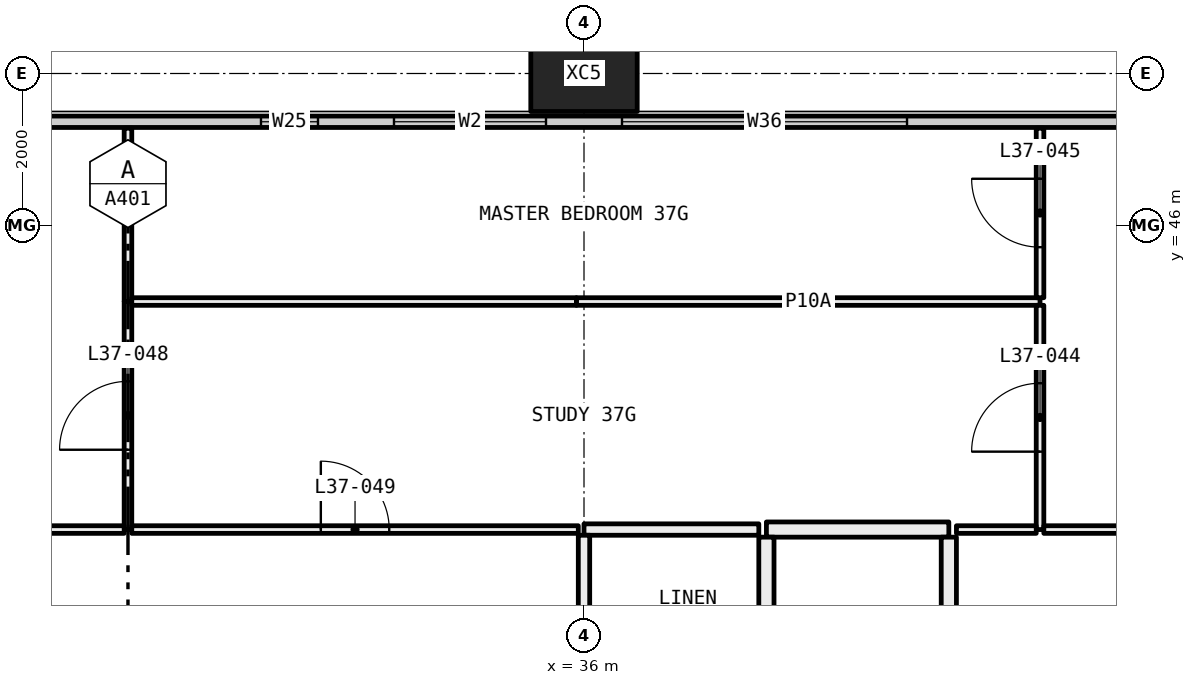
"""IFC4 building model, lengths in metres.
Left out: names, types, materials, properties, quantities, classifications, styles, units other than length and angle.
Written with IfcOpenShell. Run it as: python <this file> out.ifc"""

import sys

from ifc_helpers import new_model, si_unit, direction, frame, frame_2d, origin, origin_2d, place, context, subcontext, project, spatial, rectangle, hollow_rectangle, extrude, element, fill, save


model = new_model("IFC4")
c1 = context("Model", 3, precision=1e-05, world=origin(), true_north=direction((0.0, 1.0)))
c2 = subcontext(c1, "Body", "Model", "MODEL_VIEW")
j1 = project(units=[si_unit("LENGTHUNIT", "METRE"), si_unit("PLANEANGLEUNIT", "RADIAN")], contexts=[c1])
p1 = place(None, origin())
s1 = spatial("IfcSite", under=j1, at=p1, CompositionType="ELEMENT")
p2 = place(p1, origin())
s2 = spatial("IfcBuilding", under=s1, at=p2, CompositionType="ELEMENT")
p3 = place(p2, frame((0.0, 0.0, 141.45)))
s3 = spatial("IfcBuildingStorey", under=s2, at=p3, CompositionType="ELEMENT", Elevation=141.45)
p4 = place(p3, frame((36.0, 48.0, -0.4), z_axis=(0.0, 0.0, 1.0), x_axis=(1.0, 0.0, 0.0)))
e1 = element("IfcColumn", 1, at=p4, inside=s3, PredefinedType="COLUMN", context=c2, shape_type="SweptSolid", body=[
    extrude(hollow_rectangle(XDim=1.4, YDim=1.0, WallThickness=0.055, at=origin_2d()), origin(), (0.0, 0.0, 1.0), 3.45),
])
p5 = place(p3, frame((6.56, 47.365, 0.0), z_axis=(0.0, 0.0, 1.0), x_axis=(1.0, 0.0, 0.0)))
e2 = element("IfcWall", 2, at=p5, inside=s3, PredefinedType="ELEMENTEDWALL", context=c2, shape_type="SweptSolid", body=[
    extrude(rectangle(XDim=58.88, YDim=0.15, at=frame_2d((29.44, 0.0))), origin(), (0.0, 0.0, 1.0), 3.05),
])
p6 = place(p5, frame((0.44, 0.0, 0.45)))
e3 = element("IfcOpeningElement", 3, at=p6, cuts=e2, PredefinedType="OPENING", context=c2, shape_type="SweptSolid", body=[
    extrude(rectangle(XDim=4.5, YDim=2.55, at=frame_2d((2.25, 1.275))), frame((0.0, 0.085, 0.0), z_axis=(0.0, -1.0, 0.0), x_axis=(1.0, 0.0, 0.0)), (0.0, 0.0, 1.0), 0.17),
])
p7 = place(p5, frame((5.94, 0.0, 0.45)))
e4 = element("IfcOpeningElement", 4, at=p7, cuts=e2, PredefinedType="OPENING", context=c2, shape_type="SweptSolid", body=[
    extrude(rectangle(XDim=3.75, YDim=2.55, at=frame_2d((1.875, 1.275))), frame((0.0, 0.085, 0.0), z_axis=(0.0, -1.0, 0.0), x_axis=(1.0, 0.0, 0.0)), (0.0, 0.0, 1.0), 0.17),
])
p8 = place(p5, frame((13.19, 0.0, 0.45)))
e5 = element("IfcOpeningElement", 5, at=p8, cuts=e2, PredefinedType="OPENING", context=c2, shape_type="SweptSolid", body=[
    extrude(rectangle(XDim=3.75, YDim=2.55, at=frame_2d((1.875, 1.275))), frame((0.0, 0.085, 0.0), z_axis=(0.0, -1.0, 0.0), x_axis=(1.0, 0.0, 0.0)), (0.0, 0.0, 1.0), 0.17),
])
p9 = place(p5, frame((17.94, 0.0, 0.45)))
e6 = element("IfcOpeningElement", 6, at=p9, cuts=e2, PredefinedType="OPENING", context=c2, shape_type="SweptSolid", body=[
    extrude(rectangle(XDim=3.75, YDim=2.55, at=frame_2d((1.875, 1.275))), frame((0.0, 0.085, 0.0), z_axis=(0.0, -1.0, 0.0), x_axis=(1.0, 0.0, 0.0)), (0.0, 0.0, 1.0), 0.17),
])
p10 = place(p5, frame((25.19, 0.0, 0.45)))
e7 = element("IfcOpeningElement", 7, at=p10, cuts=e2, PredefinedType="OPENING", context=c2, shape_type="SweptSolid", body=[
    extrude(rectangle(XDim=0.75, YDim=2.55, at=frame_2d((0.375, 1.275))), frame((0.0, 0.085, 0.0), z_axis=(0.0, -1.0, 0.0), x_axis=(1.0, 0.0, 0.0)), (0.0, 0.0, 1.0), 0.17),
])
p11 = place(p5, frame((26.94, 0.0, 0.45)))
e8 = element("IfcOpeningElement", 8, at=p11, cuts=e2, PredefinedType="OPENING", context=c2, shape_type="SweptSolid", body=[
    extrude(rectangle(XDim=2.0, YDim=2.55, at=frame_2d((1.0, 1.275))), frame((0.0, 0.085, 0.0), z_axis=(0.0, -1.0, 0.0), x_axis=(1.0, 0.0, 0.0)), (0.0, 0.0, 1.0), 0.17),
])
p12 = place(p5, frame((29.94, 0.0, 0.45)))
e9 = element("IfcOpeningElement", 9, at=p12, cuts=e2, PredefinedType="OPENING", context=c2, shape_type="SweptSolid", body=[
    extrude(rectangle(XDim=3.75, YDim=2.55, at=frame_2d((1.875, 1.275))), frame((0.0, 0.085, 0.0), z_axis=(0.0, -1.0, 0.0), x_axis=(1.0, 0.0, 0.0)), (0.0, 0.0, 1.0), 0.17),
])
p13 = place(p5, frame((37.19, 0.0, 0.45)))
e10 = element("IfcOpeningElement", 10, at=p13, cuts=e2, PredefinedType="OPENING", context=c2, shape_type="SweptSolid", body=[
    extrude(rectangle(XDim=3.75, YDim=2.55, at=frame_2d((1.875, 1.275))), frame((0.0, 0.085, 0.0), z_axis=(0.0, -1.0, 0.0), x_axis=(1.0, 0.0, 0.0)), (0.0, 0.0, 1.0), 0.17),
])
p14 = place(p5, frame((41.94, 0.0, 0.45)))
e11 = element("IfcOpeningElement", 11, at=p14, cuts=e2, PredefinedType="OPENING", context=c2, shape_type="SweptSolid", body=[
    extrude(rectangle(XDim=3.75, YDim=2.55, at=frame_2d((1.875, 1.275))), frame((0.0, 0.085, 0.0), z_axis=(0.0, -1.0, 0.0), x_axis=(1.0, 0.0, 0.0)), (0.0, 0.0, 1.0), 0.17),
])
p15 = place(p5, frame((49.19, 0.0, 0.45)))
e12 = element("IfcOpeningElement", 12, at=p15, cuts=e2, PredefinedType="OPENING", context=c2, shape_type="SweptSolid", body=[
    extrude(rectangle(XDim=0.75, YDim=2.55, at=frame_2d((0.375, 1.275))), frame((0.0, 0.085, 0.0), z_axis=(0.0, -1.0, 0.0), x_axis=(1.0, 0.0, 0.0)), (0.0, 0.0, 1.0), 0.17),
])
p16 = place(p5, frame((50.94, 0.0, 0.45)))
e13 = element("IfcOpeningElement", 13, at=p16, cuts=e2, PredefinedType="OPENING", context=c2, shape_type="SweptSolid", body=[
    extrude(rectangle(XDim=2.0, YDim=2.55, at=frame_2d((1.0, 1.275))), frame((0.0, 0.085, 0.0), z_axis=(0.0, -1.0, 0.0), x_axis=(1.0, 0.0, 0.0)), (0.0, 0.0, 1.0), 0.17),
])
p17 = place(p5, frame((53.94, 0.0, 0.45)))
e14 = element("IfcOpeningElement", 14, at=p17, cuts=e2, PredefinedType="OPENING", context=c2, shape_type="SweptSolid", body=[
    extrude(rectangle(XDim=4.5, YDim=2.55, at=frame_2d((2.25, 1.275))), frame((0.0, 0.085, 0.0), z_axis=(0.0, -1.0, 0.0), x_axis=(1.0, 0.0, 0.0)), (0.0, 0.0, 1.0), 0.17),
])
p18 = place(p3, frame((30.0, 42.0, 0.0), z_axis=(0.0, 0.0, 1.0), x_axis=(0.0, 1.0, 0.0)))
e15 = element("IfcWall", 15, at=p18, inside=s3, PredefinedType="PARTITIONING", context=c2, shape_type="SweptSolid", body=[
    extrude(rectangle(XDim=3.0, YDim=0.1, at=frame_2d((1.5, 0.0))), origin(), (0.0, 0.0, 1.0), 3.05),
])
p19 = place(p18, frame((1.05, 0.0, 0.0)))
e16 = element("IfcOpeningElement", 16, at=p19, cuts=e15, PredefinedType="OPENING", context=c2, shape_type="SweptSolid", body=[
    extrude(rectangle(XDim=0.9, YDim=2.1, at=frame_2d((0.45, 1.05))), frame((0.0, 0.06, 0.0), z_axis=(0.0, -1.0, 0.0), x_axis=(1.0, 0.0, 0.0)), (0.0, 0.0, 1.0), 0.12),
])
p20 = place(p3, frame((30.0, 45.0, 0.0), z_axis=(0.0, 0.0, 1.0), x_axis=(0.0, 1.0, 0.0)))
e17 = element("IfcWall", 17, at=p20, inside=s3, PredefinedType="PARTITIONING", context=c2, shape_type="SweptSolid", body=[
    extrude(rectangle(XDim=2.28, YDim=0.1, at=frame_2d((1.14, 0.0))), origin(), (0.0, 0.0, 1.0), 3.05),
])
p21 = place(p3, frame((26.0, 42.0, 0.0), z_axis=(0.0, 0.0, 1.0), x_axis=(1.0, 0.0, 0.0)))
e18 = element("IfcWall", 18, at=p21, inside=s3, PredefinedType="PARTITIONING", context=c2, shape_type="SweptSolid", body=[
    extrude(rectangle(XDim=3.95, YDim=0.1, at=frame_2d((1.975, 0.0))), origin(), (0.0, 0.0, 1.0), 3.05),
])
p22 = place(p3, frame((42.0, 45.0, 0.0), z_axis=(0.0, 0.0, 1.0), x_axis=(-1.0, 0.0, 0.0)))
e19 = element("IfcWall", 19, at=p22, inside=s3, PredefinedType="PARTITIONING", context=c2, shape_type="SweptSolid", body=[
    extrude(rectangle(XDim=6.1, YDim=0.1, at=frame_2d((3.05, 0.0))), origin(), (0.0, 0.0, 1.0), 2.45),
])
p23 = place(p3, frame((35.9, 45.0, 0.0), z_axis=(0.0, 0.0, 1.0), x_axis=(-1.0, 0.0, 0.0)))
e20 = element("IfcWall", 20, at=p23, inside=s3, PredefinedType="PARTITIONING", context=c2, shape_type="SweptSolid", body=[
    extrude(rectangle(XDim=5.85, YDim=0.1, at=frame_2d((2.925, 0.0))), origin(), (0.0, 0.0, 1.0), 3.05),
])
p24 = place(p3, frame((42.0, 42.0, 0.0), z_axis=(0.0, 0.0, 1.0), x_axis=(0.0, 1.0, 0.0)))
e21 = element("IfcWall", 21, at=p24, inside=s3, PredefinedType="PARTITIONING", context=c2, shape_type="SweptSolid", body=[
    extrude(rectangle(XDim=2.95, YDim=0.1, at=frame_2d((1.475, 0.0))), origin(), (0.0, 0.0, 1.0), 3.05),
])
p25 = place(p24, frame((1.025, 0.0, 0.0)))
e22 = element("IfcOpeningElement", 22, at=p25, cuts=e21, PredefinedType="OPENING", context=c2, shape_type="SweptSolid", body=[
    extrude(rectangle(XDim=0.9, YDim=2.1, at=frame_2d((0.45, 1.05))), frame((0.0, 0.06, 0.0), z_axis=(0.0, -1.0, 0.0), x_axis=(1.0, 0.0, 0.0)), (0.0, 0.0, 1.0), 0.12),
])
p26 = place(p3, frame((30.05, 42.0, 0.0), z_axis=(0.0, 0.0, 1.0), x_axis=(1.0, 0.0, 0.0)))
e23 = element("IfcWall", 23, at=p26, inside=s3, PredefinedType="PARTITIONING", context=c2, shape_type="SweptSolid", body=[
    extrude(rectangle(XDim=5.875, YDim=0.1, at=frame_2d((2.938, 0.0))), origin(), (0.0, 0.0, 1.0), 2.45),
])
p27 = place(p26, frame((2.488, 0.0, 0.0)))
e24 = element("IfcOpeningElement", 24, at=p27, cuts=e23, PredefinedType="OPENING", context=c2, shape_type="SweptSolid", body=[
    extrude(rectangle(XDim=0.9, YDim=2.1, at=frame_2d((0.45, 1.05))), frame((0.0, 0.06, 0.0), z_axis=(0.0, -1.0, 0.0), x_axis=(1.0, 0.0, 0.0)), (0.0, 0.0, 1.0), 0.12),
])
p28 = place(p3, frame((36.0, 42.0, 0.0), z_axis=(0.0, 0.0, 1.0), x_axis=(1.0, 0.0, 0.0)))
e25 = element("IfcWall", 25, at=p28, inside=s3, PredefinedType="PARTITIONING", context=c2, shape_type="SweptSolid", body=[
    extrude(rectangle(XDim=2.3, YDim=0.15, at=frame_2d((1.15, 0.0))), origin(), (0.0, 0.0, 1.0), 2.45),
])
p29 = place(p3, frame((40.9, 42.0, 0.0), z_axis=(0.0, 0.0, 1.0), x_axis=(1.0, 0.0, 0.0)))
e26 = element("IfcWall", 26, at=p29, inside=s3, PredefinedType="PARTITIONING", context=c2, shape_type="SweptSolid", body=[
    extrude(rectangle(XDim=1.05, YDim=0.1, at=frame_2d((0.525, 0.0))), origin(), (0.0, 0.0, 1.0), 3.05),
])
p30 = place(p3, frame((38.4, 42.0, 0.0), z_axis=(0.0, 0.0, 1.0), x_axis=(1.0, 0.0, 0.0)))
e27 = element("IfcWall", 27, at=p30, inside=s3, PredefinedType="PARTITIONING", context=c2, shape_type="SweptSolid", body=[
    extrude(rectangle(XDim=2.4, YDim=0.2, at=frame_2d((1.2, 0.0))), origin(), (0.0, 0.0, 1.0), 3.05),
])
p31 = place(p3, frame((42.0, 45.05, 0.0), z_axis=(0.0, 0.0, 1.0), x_axis=(0.0, 1.0, 0.0)))
e28 = element("IfcWall", 28, at=p31, inside=s3, PredefinedType="PARTITIONING", context=c2, shape_type="SweptSolid", body=[
    extrude(rectangle(XDim=2.23, YDim=0.1, at=frame_2d((1.115, 0.0))), origin(), (0.0, 0.0, 1.0), 3.05),
])
p32 = place(p31, frame((0.665, 0.0, 0.0)))
e29 = element("IfcOpeningElement", 29, at=p32, cuts=e28, PredefinedType="OPENING", context=c2, shape_type="SweptSolid", body=[
    extrude(rectangle(XDim=0.9, YDim=2.1, at=frame_2d((0.45, 1.05))), frame((0.0, 0.06, 0.0), z_axis=(0.0, -1.0, 0.0), x_axis=(1.0, 0.0, 0.0)), (0.0, 0.0, 1.0), 0.12),
])
p33 = place(p3, frame((42.05, 42.0, 0.0), z_axis=(0.0, 0.0, 1.0), x_axis=(1.0, 0.0, 0.0)))
e30 = element("IfcWall", 30, at=p33, inside=s3, PredefinedType="PARTITIONING", context=c2, shape_type="SweptSolid", body=[
    extrude(rectangle(XDim=3.95, YDim=0.1, at=frame_2d((1.975, 0.0))), origin(), (0.0, 0.0, 1.0), 3.05),
])
p34 = place(p33, frame((1.525, 0.0, 0.0)))
e31 = element("IfcOpeningElement", 31, at=p34, cuts=e30, PredefinedType="OPENING", context=c2, shape_type="SweptSolid", body=[
    extrude(rectangle(XDim=0.9, YDim=2.1, at=frame_2d((0.45, 1.05))), frame((0.0, 0.06, 0.0), z_axis=(0.0, -1.0, 0.0), x_axis=(1.0, 0.0, 0.0)), (0.0, 0.0, 1.0), 0.12),
])
p35 = place(p3, frame((36.0, 37.95, 0.0), z_axis=(0.0, 0.0, 1.0), x_axis=(0.0, 1.0, 0.0)))
e32 = element("IfcWall", 32, at=p35, inside=s3, PredefinedType="PARTITIONING", context=c2, shape_type="SweptSolid", body=[
    extrude(rectangle(XDim=3.975, YDim=0.15, at=frame_2d((1.988, 0.0))), origin(), (0.0, 0.0, 1.0), 2.45),
])
p36 = place(p35, frame((1.538, 0.0, 0.0)))
e33 = element("IfcOpeningElement", 33, at=p36, cuts=e32, PredefinedType="OPENING", context=c2, shape_type="SweptSolid", body=[
    extrude(rectangle(XDim=0.9, YDim=2.1, at=frame_2d((0.45, 1.05))), frame((0.0, 0.085, 0.0), z_axis=(0.0, -1.0, 0.0), x_axis=(1.0, 0.0, 0.0)), (0.0, 0.0, 1.0), 0.17),
])
p37 = place(p3, frame((38.4, 37.95, 0.0), z_axis=(0.0, 0.0, 1.0), x_axis=(0.0, 1.0, 0.0)))
e34 = element("IfcWall", 34, at=p37, inside=s3, PredefinedType="PARTITIONING", context=c2, shape_type="SweptSolid", body=[
    extrude(rectangle(XDim=3.95, YDim=0.2, at=frame_2d((1.975, 0.0))), origin(), (0.0, 0.0, 1.0), 3.05),
])
p38 = place(p3, frame((40.8, 41.9, 0.0), z_axis=(0.0, 0.0, 1.0), x_axis=(0.0, -1.0, 0.0)))
e35 = element("IfcWall", 35, at=p38, inside=s3, PredefinedType="PARTITIONING", context=c2, shape_type="SweptSolid", body=[
    extrude(rectangle(XDim=6.2, YDim=0.2, at=frame_2d((3.1, 0.0))), origin(), (0.0, 0.0, 1.0), 2.45),
])
p39 = place(p10, origin())
e36 = element("IfcWindow", 36, at=p39, inside=s3, PartitioningType="SINGLE_PANEL", PredefinedType="WINDOW", context=c2, shape_type="SweptSolid", body=[
    extrude(rectangle(XDim=0.75, YDim=2.55, at=frame_2d((0.375, 1.275))), frame((0.0, 0.03, 0.0), z_axis=(0.0, -1.0, 0.0), x_axis=(1.0, 0.0, 0.0)), (0.0, 0.0, 1.0), 0.06),
])
fill(e7, e36)
p40 = place(p11, origin())
e37 = element("IfcWindow", 37, at=p40, inside=s3, PartitioningType="SINGLE_PANEL", PredefinedType="WINDOW", context=c2, shape_type="SweptSolid", body=[
    extrude(rectangle(XDim=2.0, YDim=2.55, at=frame_2d((1.0, 1.275))), frame((0.0, 0.03, 0.0), z_axis=(0.0, -1.0, 0.0), x_axis=(1.0, 0.0, 0.0)), (0.0, 0.0, 1.0), 0.06),
])
fill(e8, e37)
p41 = place(p12, origin())
e38 = element("IfcWindow", 38, at=p41, inside=s3, PartitioningType="SINGLE_PANEL", PredefinedType="WINDOW", context=c2, shape_type="SweptSolid", body=[
    extrude(rectangle(XDim=3.75, YDim=2.55, at=frame_2d((1.875, 1.275))), frame((0.0, 0.03, 0.0), z_axis=(0.0, -1.0, 0.0), x_axis=(1.0, 0.0, 0.0)), (0.0, 0.0, 1.0), 0.06),
])
fill(e9, e38)
p42 = place(p25, origin())
e39 = element("IfcDoor", 39, at=p42, inside=s3, OperationType="SINGLE_SWING_RIGHT", PredefinedType="DOOR", context=c2, shape_type="SweptSolid", body=[
    extrude(rectangle(XDim=0.9, YDim=2.1, at=frame_2d((0.45, 1.05))), frame((0.0, 0.025, 0.0), z_axis=(0.0, -1.0, 0.0), x_axis=(1.0, 0.0, 0.0)), (0.0, 0.0, 1.0), 0.05),
])
fill(e22, e39)
p43 = place(p32, origin())
e40 = element("IfcDoor", 40, at=p43, inside=s3, OperationType="SINGLE_SWING_LEFT", PredefinedType="DOOR", context=c2, shape_type="SweptSolid", body=[
    extrude(rectangle(XDim=0.9, YDim=2.1, at=frame_2d((0.45, 1.05))), frame((0.0, 0.025, 0.0), z_axis=(0.0, -1.0, 0.0), x_axis=(1.0, 0.0, 0.0)), (0.0, 0.0, 1.0), 0.05),
])
fill(e29, e40)
p44 = place(p19, origin())
e41 = element("IfcDoor", 41, at=p44, inside=s3, OperationType="SINGLE_SWING_RIGHT", PredefinedType="DOOR", context=c2, shape_type="SweptSolid", body=[
    extrude(rectangle(XDim=0.9, YDim=2.1, at=frame_2d((0.45, 1.05))), frame((0.0, 0.025, 0.0), z_axis=(0.0, -1.0, 0.0), x_axis=(1.0, 0.0, 0.0)), (0.0, 0.0, 1.0), 0.05),
])
fill(e16, e41)
p45 = place(p27, origin())
e42 = element("IfcDoor", 42, at=p45, inside=s3, OperationType="SINGLE_SWING_RIGHT", PredefinedType="DOOR", context=c2, shape_type="SweptSolid", body=[
    extrude(rectangle(XDim=0.9, YDim=2.1, at=frame_2d((0.45, 1.05))), frame((0.0, 0.025, 0.0), z_axis=(0.0, -1.0, 0.0), x_axis=(1.0, 0.0, 0.0)), (0.0, 0.0, 1.0), 0.05),
])
fill(e24, e42)
save(model, sys.argv[1])
